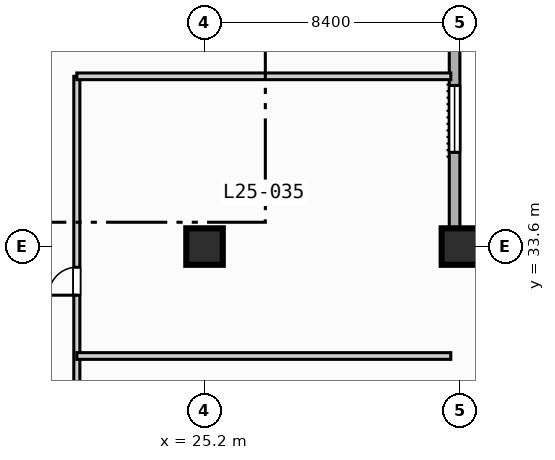
"""IFC4 building model, lengths in metres.
Left out: names, types, materials, properties, quantities, classifications, styles, units other than length and angle.
Written with IfcOpenShell. Run it as: python <this file> out.ifc"""

import sys

from ifc_helpers import new_model, si_unit, direction, frame, frame_2d, origin, origin_2d, place, context, subcontext, project, spatial, rectangle, extrude, element, fill, save


model = new_model("IFC4")
c1 = context("Model", 3, precision=1e-05, world=origin(), true_north=direction((0.0, 1.0)))
c2 = subcontext(c1, "Body", "Model", "MODEL_VIEW")
j1 = project(units=[si_unit("LENGTHUNIT", "METRE"), si_unit("PLANEANGLEUNIT", "RADIAN")], contexts=[c1])
p1 = place(None, origin())
s1 = spatial("IfcSite", under=j1, at=p1, CompositionType="ELEMENT")
p2 = place(p1, origin())
s2 = spatial("IfcBuilding", under=s1, at=p2, CompositionType="ELEMENT")
p3 = place(p2, frame((0.0, 0.0, 107.6)))
s3 = spatial("IfcBuildingStorey", under=s2, at=p3, CompositionType="ELEMENT", Elevation=107.6)
for number, where, z_axis, x_axis in (
    (1, (25.2, 33.6, 0.0), (0.0, 0.0, 1.0), (1.0, 0.0, 0.0)),
    (2, (33.6, 33.6, 0.0), (0.0, 0.0, 1.0), (1.0, 0.0, 0.0)),
):
    element("IfcColumn", number, at=place(p3, frame(where, z_axis=z_axis, x_axis=x_axis)), inside=s3, PredefinedType="COLUMN", context=c2, shape_type="SweptSolid", body=[
        extrude(rectangle(XDim=1.2, YDim=1.2, at=origin_2d()), origin(), (0.0, 0.0, 1.0), 3.8),
    ])
p4 = place(p3, frame((33.425, 89.225, 0.0), z_axis=(0.0, 0.0, 1.0), x_axis=(0.0, -1.0, 0.0)))
e3 = element("IfcWall", 3, at=p4, inside=s3, PredefinedType="STANDARD", context=c2, shape_type="SweptSolid", body=[
    extrude(rectangle(XDim=55.8, YDim=0.35, at=frame_2d((27.9, 0.0))), origin(), (0.0, 0.0, 1.0), 3.55),
])
p5 = place(p4, frame((50.325, 0.0, 0.85)))
e4 = element("IfcOpeningElement", 4, at=p5, cuts=e3, PredefinedType="OPENING", context=c2, shape_type="SweptSolid", body=[
    extrude(rectangle(XDim=2.2, YDim=1.8, at=frame_2d((1.1, 0.9))), frame((0.0, 0.185, 0.0), z_axis=(0.0, -1.0, 0.0), x_axis=(1.0, 0.0, 0.0)), (0.0, 0.0, 1.0), 0.37),
])
p6 = place(p4, frame((33.525, 0.0, 0.85)))
e5 = element("IfcOpeningElement", 5, at=p6, cuts=e3, PredefinedType="OPENING", context=c2, shape_type="SweptSolid", body=[
    extrude(rectangle(XDim=2.2, YDim=1.8, at=frame_2d((1.1, 0.9))), frame((0.0, 0.185, 0.0), z_axis=(0.0, -1.0, 0.0), x_axis=(1.0, 0.0, 0.0)), (0.0, 0.0, 1.0), 0.37),
])
p7 = place(p4, frame((25.125, 0.0, 0.85)))
e6 = element("IfcOpeningElement", 6, at=p7, cuts=e3, PredefinedType="OPENING", context=c2, shape_type="SweptSolid", body=[
    extrude(rectangle(XDim=2.2, YDim=1.8, at=frame_2d((1.1, 0.9))), frame((0.0, 0.185, 0.0), z_axis=(0.0, -1.0, 0.0), x_axis=(1.0, 0.0, 0.0)), (0.0, 0.0, 1.0), 0.37),
])
p8 = place(p4, frame((16.725, 0.0, 0.85)))
e7 = element("IfcOpeningElement", 7, at=p8, cuts=e3, PredefinedType="OPENING", context=c2, shape_type="SweptSolid", body=[
    extrude(rectangle(XDim=2.2, YDim=1.8, at=frame_2d((1.1, 0.9))), frame((0.0, 0.185, 0.0), z_axis=(0.0, -1.0, 0.0), x_axis=(1.0, 0.0, 0.0)), (0.0, 0.0, 1.0), 0.37),
])
p9 = place(p4, frame((8.325, 0.0, 0.85)))
e8 = element("IfcOpeningElement", 8, at=p9, cuts=e3, PredefinedType="OPENING", context=c2, shape_type="SweptSolid", body=[
    extrude(rectangle(XDim=2.2, YDim=1.8, at=frame_2d((1.1, 0.9))), frame((0.0, 0.185, 0.0), z_axis=(0.0, -1.0, 0.0), x_axis=(1.0, 0.0, 0.0)), (0.0, 0.0, 1.0), 0.37),
])
p10 = place(p3, frame((33.425, 33.425, 0.0), z_axis=(0.0, 0.0, 1.0), x_axis=(1.0, 0.0, 0.0)))
e9 = element("IfcWall", 9, at=p10, inside=s3, PredefinedType="STANDARD", context=c2, shape_type="SweptSolid", body=[
    extrude(rectangle(XDim=39.0, YDim=0.35, at=frame_2d((19.5, 0.0))), origin(), (0.0, 0.0, 1.0), 3.55),
])
p11 = place(p10, frame((12.075, 0.0, 0.0)))
e10 = element("IfcOpeningElement", 10, at=p11, cuts=e9, PredefinedType="OPENING", context=c2, shape_type="SweptSolid", body=[
    extrude(rectangle(XDim=1.4, YDim=2.2, at=frame_2d((0.7, 1.1))), frame((0.0, 0.185, 0.0), z_axis=(0.0, -1.0, 0.0), x_axis=(1.0, 0.0, 0.0)), (0.0, 0.0, 1.0), 0.37),
])
p12 = place(p10, frame((20.075, 0.0, 0.85)))
e11 = element("IfcOpeningElement", 11, at=p12, cuts=e9, PredefinedType="OPENING", context=c2, shape_type="SweptSolid", body=[
    extrude(rectangle(XDim=2.2, YDim=1.8, at=frame_2d((1.1, 0.9))), frame((0.0, 0.185, 0.0), z_axis=(0.0, -1.0, 0.0), x_axis=(1.0, 0.0, 0.0)), (0.0, 0.0, 1.0), 0.37),
])
p13 = place(p10, frame((28.475, 0.0, 0.85)))
e12 = element("IfcOpeningElement", 12, at=p13, cuts=e9, PredefinedType="OPENING", context=c2, shape_type="SweptSolid", body=[
    extrude(rectangle(XDim=2.2, YDim=1.8, at=frame_2d((1.1, 0.9))), frame((0.0, 0.185, 0.0), z_axis=(0.0, -1.0, 0.0), x_axis=(1.0, 0.0, 0.0)), (0.0, 0.0, 1.0), 0.37),
])
p14 = place(p3, frame((21.0, 21.0, 0.0), z_axis=(0.0, 0.0, 1.0), x_axis=(0.0, 1.0, 0.0)))
e13 = element("IfcWall", 13, at=p14, inside=s3, PredefinedType="PARTITIONING", context=c2, shape_type="SweptSolid", body=[
    extrude(rectangle(XDim=18.2, YDim=0.2, at=frame_2d((9.1, 0.0))), origin(), (0.0, 0.0, 1.0), 3.55),
])
p15 = place(p14, frame((2.0, 0.0, 0.0)))
e14 = element("IfcOpeningElement", 14, at=p15, cuts=e13, PredefinedType="OPENING", context=c2, shape_type="SweptSolid", body=[
    extrude(rectangle(XDim=0.92, YDim=2.1, at=frame_2d((0.46, 1.05))), frame((0.0, 0.11, 0.0), z_axis=(0.0, -1.0, 0.0), x_axis=(1.0, 0.0, 0.0)), (0.0, 0.0, 1.0), 0.22),
])
p16 = place(p14, frame((11.0, 0.0, 0.0)))
e15 = element("IfcOpeningElement", 15, at=p16, cuts=e13, PredefinedType="OPENING", context=c2, shape_type="SweptSolid", body=[
    extrude(rectangle(XDim=0.92, YDim=2.1, at=frame_2d((0.46, 1.05))), frame((0.0, 0.11, 0.0), z_axis=(0.0, -1.0, 0.0), x_axis=(1.0, 0.0, 0.0)), (0.0, 0.0, 1.0), 0.22),
])
for number, where, z_axis, x_axis in (
    (16, (21.0, 30.0, 0.0), (0.0, 0.0, 1.0), (1.0, 0.0, 0.0)),
    (17, (21.0, 39.2, 0.0), (0.0, 0.0, 1.0), (1.0, 0.0, 0.0)),
):
    element("IfcWall", number, at=place(p3, frame(where, z_axis=z_axis, x_axis=x_axis)), inside=s3, PredefinedType="PARTITIONING", context=c2, shape_type="SweptSolid", body=[
        extrude(rectangle(XDim=12.3, YDim=0.22, at=frame_2d((6.15, 0.0))), origin(), (0.0, 0.0, 1.0), 3.55),
    ])
p17 = place(p5, origin())
e18 = element("IfcWindow", 18, at=p17, inside=s3, PartitioningType="SINGLE_PANEL", PredefinedType="WINDOW", context=c2, shape_type="SweptSolid", body=[
    extrude(rectangle(XDim=2.2, YDim=1.8, at=frame_2d((1.1, 0.9))), frame((0.0, 0.03, 0.0), z_axis=(0.0, -1.0, 0.0), x_axis=(1.0, 0.0, 0.0)), (0.0, 0.0, 1.0), 0.06),
])
fill(e4, e18)
p18 = place(p16, origin())
e19 = element("IfcDoor", 19, at=p18, inside=s3, OperationType="SINGLE_SWING_LEFT", PredefinedType="DOOR", context=c2, shape_type="SweptSolid", body=[
    extrude(rectangle(XDim=0.92, YDim=2.1, at=frame_2d((0.46, 1.05))), frame((0.0, 0.025, 0.0), z_axis=(0.0, -1.0, 0.0), x_axis=(1.0, 0.0, 0.0)), (0.0, 0.0, 1.0), 0.05),
])
fill(e15, e19)
save(model, sys.argv[1])
